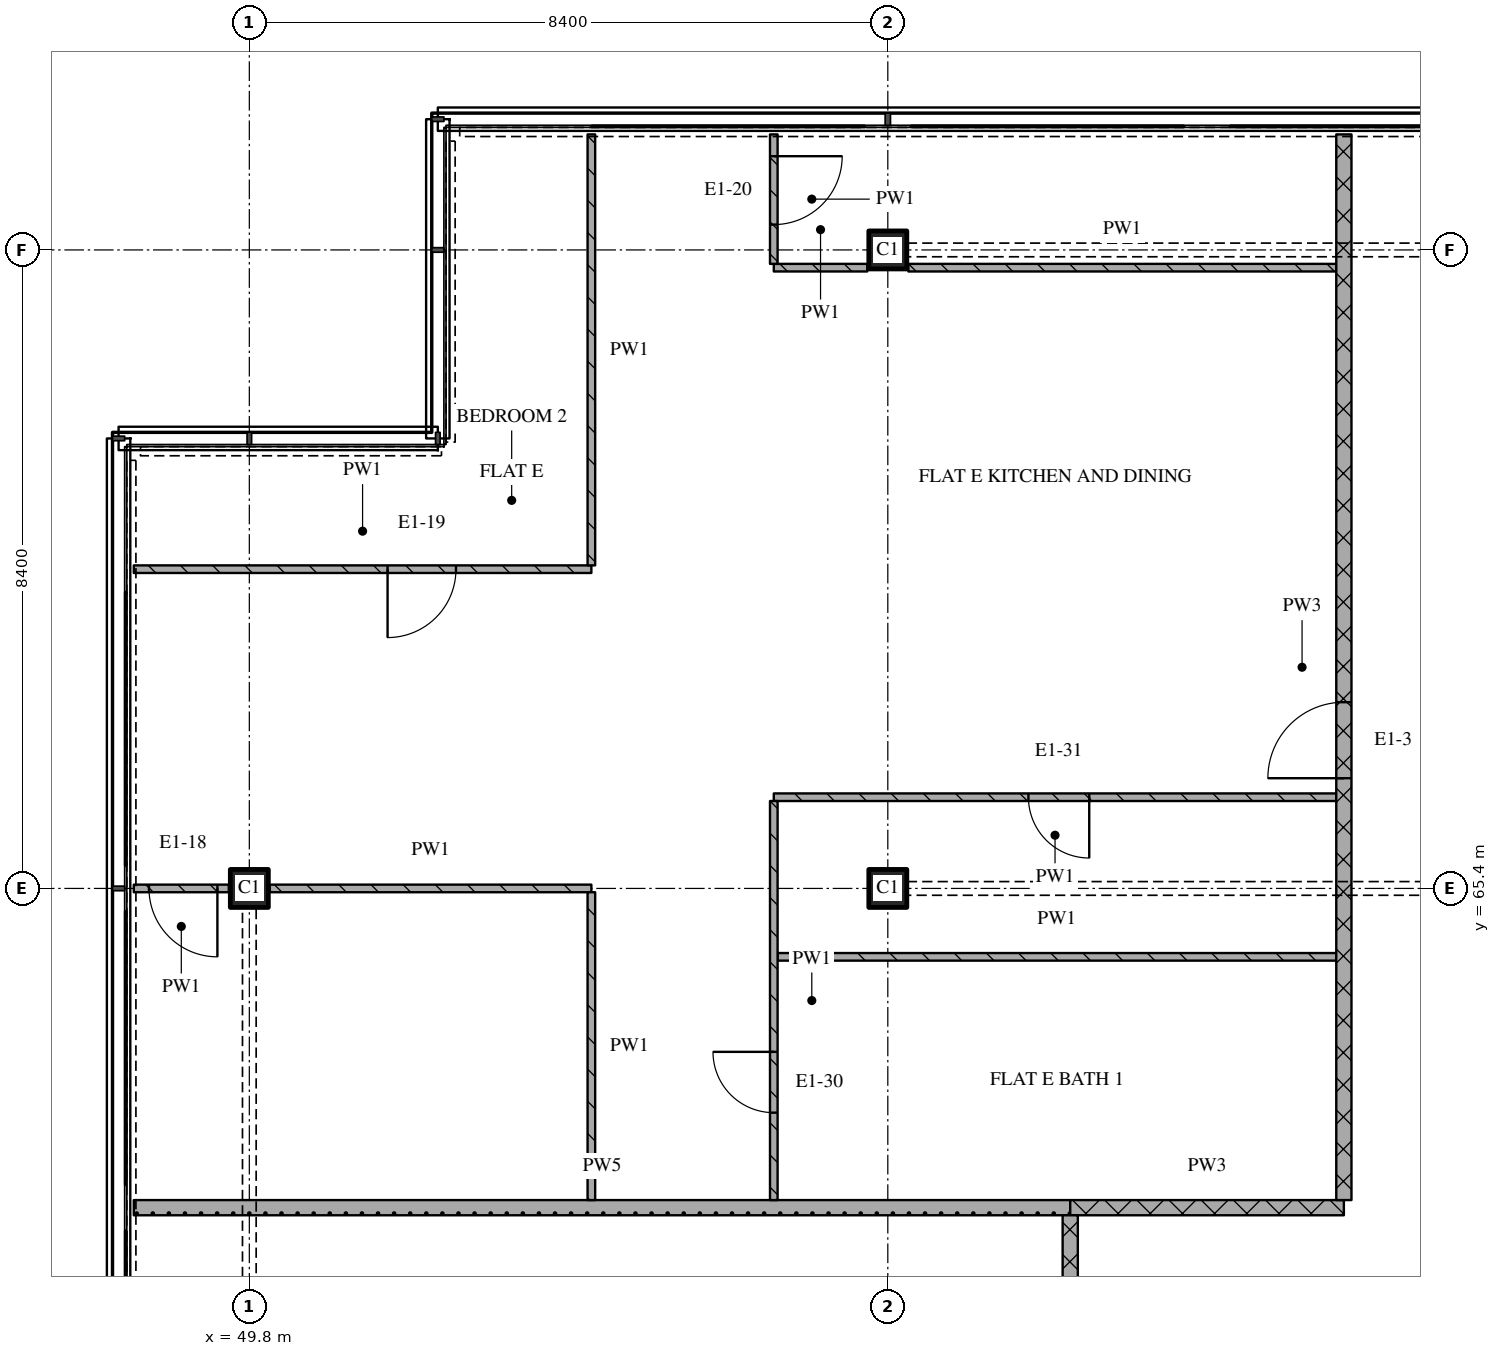
"""IFC4 building model, lengths in metres.
Left out: names, types, materials, properties, quantities, classifications, styles, units other than length and angle.
Written with IfcOpenShell. Run it as: python <this file> out.ifc"""

import sys

from ifc_helpers import new_model, si_unit, direction, frame, frame_2d, origin, origin_2d, place, context, subcontext, project, spatial, rectangle, extrude, element, fill, save


model = new_model("IFC4")
c1 = context("Model", 3, precision=1e-05, world=origin(), true_north=direction((0.0, 1.0)))
c2 = subcontext(c1, "Body", "Model", "MODEL_VIEW")
j1 = project(units=[si_unit("LENGTHUNIT", "METRE"), si_unit("PLANEANGLEUNIT", "RADIAN")], contexts=[c1])
p1 = place(None, origin())
s1 = spatial("IfcSite", under=j1, at=p1, CompositionType="ELEMENT")
p2 = place(p1, origin())
s2 = spatial("IfcBuilding", under=s1, at=p2, CompositionType="ELEMENT")
p3 = place(p2, frame((0.0, 0.0, 267.15)))
s3 = spatial("IfcBuildingStorey", under=s2, at=p3, CompositionType="ELEMENT", Elevation=267.15)
for number, where, z_axis, x_axis in (
    (1, (49.8, 65.4, 0.0), (0.0, 0.0, 1.0), (1.0, 0.0, 0.0)),
    (2, (58.2, 65.4, 0.0), (0.0, 0.0, 1.0), (1.0, 0.0, 0.0)),
    (3, (58.2, 73.8, 0.0), (0.0, 0.0, 1.0), (1.0, 0.0, 0.0)),
):
    element("IfcColumn", number, at=place(p3, frame(where, z_axis=z_axis, x_axis=x_axis)), inside=s3, PredefinedType="COLUMN", context=c2, shape_type="SweptSolid", body=[
        extrude(rectangle(XDim=0.5, YDim=0.5, at=origin_2d()), origin(), (0.0, 0.0, 1.0), 3.6),
    ])
p4 = place(p3, frame((60.6, 61.2, 0.0), z_axis=(0.0, 0.0, 1.0), x_axis=(1.0, 0.0, 0.0)))
e4 = element("IfcWall", 4, at=p4, inside=s3, PredefinedType="PARTITIONING", context=c2, shape_type="SweptSolid", body=[
    extrude(rectangle(XDim=3.6, YDim=0.2, at=frame_2d((1.8, 0.0))), origin(), (0.0, 0.0, 1.0), 3.32),
])
p5 = place(p3, frame((48.28, 61.2, 0.0), z_axis=(0.0, 0.0, 1.0), x_axis=(1.0, 0.0, 0.0)))
e5 = element("IfcWall", 5, at=p5, inside=s3, PredefinedType="PARTITIONING", context=c2, shape_type="SweptSolid", body=[
    extrude(rectangle(XDim=12.32, YDim=0.2, at=frame_2d((6.16, 0.0))), origin(), (0.0, 0.0, 1.0), 3.32),
])
p6 = place(p3, frame((56.75, 64.5, 0.0), z_axis=(0.0, 0.0, 1.0), x_axis=(1.0, 0.0, 0.0)))
e6 = element("IfcWall", 6, at=p6, inside=s3, PredefinedType="PARTITIONING", context=c2, shape_type="SweptSolid", body=[
    extrude(rectangle(XDim=7.35, YDim=0.1, at=frame_2d((3.675, 0.0))), origin(), (0.0, 0.0, 1.0), 3.32),
])
p7 = place(p3, frame((49.53, 65.4, 0.0), z_axis=(0.0, 0.0, 1.0), x_axis=(-1.0, 0.0, 0.0)))
e7 = element("IfcWall", 7, at=p7, inside=s3, PredefinedType="PARTITIONING", context=c2, shape_type="SweptSolid", body=[
    extrude(rectangle(XDim=1.25, YDim=0.1, at=frame_2d((0.625, 0.0))), origin(), (0.0, 0.0, 1.0), 3.32),
])
p8 = place(p7, frame((0.15, 0.0, 0.0)))
e8 = element("IfcOpeningElement", 8, at=p8, cuts=e7, PredefinedType="OPENING", context=c2, shape_type="SweptSolid", body=[
    extrude(rectangle(XDim=0.9, YDim=2.1, at=frame_2d((0.45, 1.05))), frame((0.0, 0.06, 0.0), z_axis=(0.0, -1.0, 0.0), x_axis=(1.0, 0.0, 0.0)), (0.0, 0.0, 1.0), 0.12),
])
p9 = place(p3, frame((50.07, 65.4, 0.0), z_axis=(0.0, 0.0, 1.0), x_axis=(1.0, 0.0, 0.0)))
e9 = element("IfcWall", 9, at=p9, inside=s3, PredefinedType="PARTITIONING", context=c2, shape_type="SweptSolid", body=[
    extrude(rectangle(XDim=4.23, YDim=0.1, at=frame_2d((2.115, 0.0))), origin(), (0.0, 0.0, 1.0), 2.83),
])
p10 = place(p3, frame((64.1, 66.6, 0.0), z_axis=(0.0, 0.0, 1.0), x_axis=(-1.0, 0.0, 0.0)))
e10 = element("IfcWall", 10, at=p10, inside=s3, PredefinedType="PARTITIONING", context=c2, shape_type="SweptSolid", body=[
    extrude(rectangle(XDim=7.4, YDim=0.1, at=frame_2d((3.7, 0.0))), origin(), (0.0, 0.0, 1.0), 3.32),
])
p11 = place(p10, frame((3.25, 0.0, 0.0)))
e11 = element("IfcOpeningElement", 11, at=p11, cuts=e10, PredefinedType="OPENING", context=c2, shape_type="SweptSolid", body=[
    extrude(rectangle(XDim=0.8, YDim=2.1, at=frame_2d((0.4, 1.05))), frame((0.0, 0.06, 0.0), z_axis=(0.0, -1.0, 0.0), x_axis=(1.0, 0.0, 0.0)), (0.0, 0.0, 1.0), 0.12),
])
p12 = place(p3, frame((48.28, 69.6, 0.0), z_axis=(0.0, 0.0, 1.0), x_axis=(1.0, 0.0, 0.0)))
e12 = element("IfcWall", 12, at=p12, inside=s3, PredefinedType="PARTITIONING", context=c2, shape_type="SweptSolid", body=[
    extrude(rectangle(XDim=6.02, YDim=0.1, at=frame_2d((3.01, 0.0))), origin(), (0.0, 0.0, 1.0), 3.32),
])
p13 = place(p12, frame((3.339, 0.0, 0.0)))
e13 = element("IfcOpeningElement", 13, at=p13, cuts=e12, PredefinedType="OPENING", context=c2, shape_type="SweptSolid", body=[
    extrude(rectangle(XDim=0.9, YDim=2.1, at=frame_2d((0.45, 1.05))), frame((0.0, 0.06, 0.0), z_axis=(0.0, -1.0, 0.0), x_axis=(1.0, 0.0, 0.0)), (0.0, 0.0, 1.0), 0.12),
])
p14 = place(p3, frame((56.7, 73.567, 0.0), z_axis=(0.0, 0.0, 1.0), x_axis=(1.0, 0.0, 0.0)))
e14 = element("IfcWall", 14, at=p14, inside=s3, PredefinedType="PARTITIONING", context=c2, shape_type="SweptSolid", body=[
    extrude(rectangle(XDim=1.23, YDim=0.1, at=frame_2d((0.615, 0.0))), origin(), (0.0, 0.0, 1.0), 3.32),
])
p15 = place(p3, frame((58.47, 73.567, 0.0), z_axis=(0.0, 0.0, 1.0), x_axis=(1.0, 0.0, 0.0)))
e15 = element("IfcWall", 15, at=p15, inside=s3, PredefinedType="PARTITIONING", context=c2, shape_type="SweptSolid", body=[
    extrude(rectangle(XDim=5.63, YDim=0.1, at=frame_2d((2.815, 0.0))), origin(), (0.0, 0.0, 1.0), 3.32),
])
p16 = place(p3, frame((54.3, 65.35, 0.0), z_axis=(0.0, 0.0, 1.0), x_axis=(0.0, -1.0, 0.0)))
e16 = element("IfcWall", 16, at=p16, inside=s3, PredefinedType="PARTITIONING", context=c2, shape_type="SweptSolid", body=[
    extrude(rectangle(XDim=4.05, YDim=0.1, at=frame_2d((2.025, 0.0))), origin(), (0.0, 0.0, 1.0), 3.32),
])
p17 = place(p3, frame((54.3, 75.32, 0.0), z_axis=(0.0, 0.0, 1.0), x_axis=(0.0, -1.0, 0.0)))
e17 = element("IfcWall", 17, at=p17, inside=s3, PredefinedType="PARTITIONING", context=c2, shape_type="SweptSolid", body=[
    extrude(rectangle(XDim=5.67, YDim=0.1, at=frame_2d((2.835, 0.0))), origin(), (0.0, 0.0, 1.0), 3.32),
])
p18 = place(p3, frame((56.7, 66.55, 0.0), z_axis=(0.0, 0.0, 1.0), x_axis=(0.0, -1.0, 0.0)))
e18 = element("IfcWall", 18, at=p18, inside=s3, PredefinedType="PARTITIONING", context=c2, shape_type="SweptSolid", body=[
    extrude(rectangle(XDim=5.25, YDim=0.1, at=frame_2d((2.625, 0.0))), origin(), (0.0, 0.0, 1.0), 3.32),
])
p19 = place(p18, frame((3.3, 0.0, 0.0)))
e19 = element("IfcOpeningElement", 19, at=p19, cuts=e18, PredefinedType="OPENING", context=c2, shape_type="SweptSolid", body=[
    extrude(rectangle(XDim=0.8, YDim=2.1, at=frame_2d((0.4, 1.05))), frame((0.0, 0.06, 0.0), z_axis=(0.0, -1.0, 0.0), x_axis=(1.0, 0.0, 0.0)), (0.0, 0.0, 1.0), 0.12),
])
p20 = place(p3, frame((56.7, 75.32, 0.0), z_axis=(0.0, 0.0, 1.0), x_axis=(0.0, -1.0, 0.0)))
e20 = element("IfcWall", 20, at=p20, inside=s3, PredefinedType="PARTITIONING", context=c2, shape_type="SweptSolid", body=[
    extrude(rectangle(XDim=1.703, YDim=0.1, at=frame_2d((0.852, 0.0))), origin(), (0.0, 0.0, 1.0), 3.32),
])
p21 = place(p20, frame((0.287, 0.0, 0.0)))
e21 = element("IfcOpeningElement", 21, at=p21, cuts=e20, PredefinedType="OPENING", context=c2, shape_type="SweptSolid", body=[
    extrude(rectangle(XDim=0.9, YDim=2.1, at=frame_2d((0.45, 1.05))), frame((0.0, 0.06, 0.0), z_axis=(0.0, -1.0, 0.0), x_axis=(1.0, 0.0, 0.0)), (0.0, 0.0, 1.0), 0.12),
])
p22 = place(p3, frame((60.6, 61.1, 0.0), z_axis=(0.0, 0.0, 1.0), x_axis=(0.0, -1.0, 0.0)))
e22 = element("IfcWall", 22, at=p22, inside=s3, PredefinedType="PARTITIONING", context=c2, shape_type="SweptSolid", body=[
    extrude(rectangle(XDim=17.8, YDim=0.2, at=frame_2d((8.9, 0.0))), origin(), (0.0, 0.0, 1.0), 3.32),
])
p23 = place(p3, frame((64.2, 61.3, 0.0), z_axis=(0.0, 0.0, 1.0), x_axis=(0.0, 1.0, 0.0)))
e23 = element("IfcWall", 23, at=p23, inside=s3, PredefinedType="PARTITIONING", context=c2, shape_type="SweptSolid", body=[
    extrude(rectangle(XDim=14.02, YDim=0.2, at=frame_2d((7.01, 0.0))), origin(), (0.0, 0.0, 1.0), 3.32),
])
p24 = place(p23, frame((5.55, 0.0, 0.0)))
e24 = element("IfcOpeningElement", 24, at=p24, cuts=e23, PredefinedType="OPENING", context=c2, shape_type="SweptSolid", body=[
    extrude(rectangle(XDim=1.0, YDim=2.1, at=frame_2d((0.5, 1.05))), frame((0.0, 0.11, 0.0), z_axis=(0.0, -1.0, 0.0), x_axis=(1.0, 0.0, 0.0)), (0.0, 0.0, 1.0), 0.22),
])
p25 = place(p8, origin())
e25 = element("IfcDoor", 25, at=p25, inside=s3, OperationType="SINGLE_SWING_LEFT", PredefinedType="DOOR", context=c2, shape_type="SweptSolid", body=[
    extrude(rectangle(XDim=0.9, YDim=2.1, at=frame_2d((0.45, 1.05))), frame((0.0, 0.025, 0.0), z_axis=(0.0, -1.0, 0.0), x_axis=(1.0, 0.0, 0.0)), (0.0, 0.0, 1.0), 0.05),
])
fill(e8, e25)
p26 = place(p11, origin())
e26 = element("IfcDoor", 26, at=p26, inside=s3, OperationType="SINGLE_SWING_LEFT", PredefinedType="DOOR", context=c2, shape_type="SweptSolid", body=[
    extrude(rectangle(XDim=0.8, YDim=2.1, at=frame_2d((0.4, 1.05))), frame((0.0, 0.025, 0.0), z_axis=(0.0, -1.0, 0.0), x_axis=(1.0, 0.0, 0.0)), (0.0, 0.0, 1.0), 0.05),
])
fill(e11, e26)
p27 = place(p13, origin())
e27 = element("IfcDoor", 27, at=p27, inside=s3, OperationType="SINGLE_SWING_RIGHT", PredefinedType="DOOR", context=c2, shape_type="SweptSolid", body=[
    extrude(rectangle(XDim=0.9, YDim=2.1, at=frame_2d((0.45, 1.05))), frame((0.0, 0.025, 0.0), z_axis=(0.0, -1.0, 0.0), x_axis=(1.0, 0.0, 0.0)), (0.0, 0.0, 1.0), 0.05),
])
fill(e13, e27)
p28 = place(p19, origin())
e28 = element("IfcDoor", 28, at=p28, inside=s3, OperationType="SINGLE_SWING_RIGHT", PredefinedType="DOOR", context=c2, shape_type="SweptSolid", body=[
    extrude(rectangle(XDim=0.8, YDim=2.1, at=frame_2d((0.4, 1.05))), frame((0.0, 0.025, 0.0), z_axis=(0.0, -1.0, 0.0), x_axis=(1.0, 0.0, 0.0)), (0.0, 0.0, 1.0), 0.05),
])
fill(e19, e28)
p29 = place(p21, origin())
e29 = element("IfcDoor", 29, at=p29, inside=s3, OperationType="SINGLE_SWING_LEFT", PredefinedType="DOOR", context=c2, shape_type="SweptSolid", body=[
    extrude(rectangle(XDim=0.9, YDim=2.1, at=frame_2d((0.45, 1.05))), frame((0.0, 0.025, 0.0), z_axis=(0.0, -1.0, 0.0), x_axis=(1.0, 0.0, 0.0)), (0.0, 0.0, 1.0), 0.05),
])
fill(e21, e29)
p30 = place(p24, origin())
e30 = element("IfcDoor", 30, at=p30, inside=s3, OperationType="SINGLE_SWING_LEFT", PredefinedType="DOOR", context=c2, shape_type="SweptSolid", body=[
    extrude(rectangle(XDim=1.0, YDim=2.1, at=frame_2d((0.5, 1.05))), frame((0.0, 0.025, 0.0), z_axis=(0.0, -1.0, 0.0), x_axis=(1.0, 0.0, 0.0)), (0.0, 0.0, 1.0), 0.05),
])
fill(e24, e30)
save(model, sys.argv[1])
